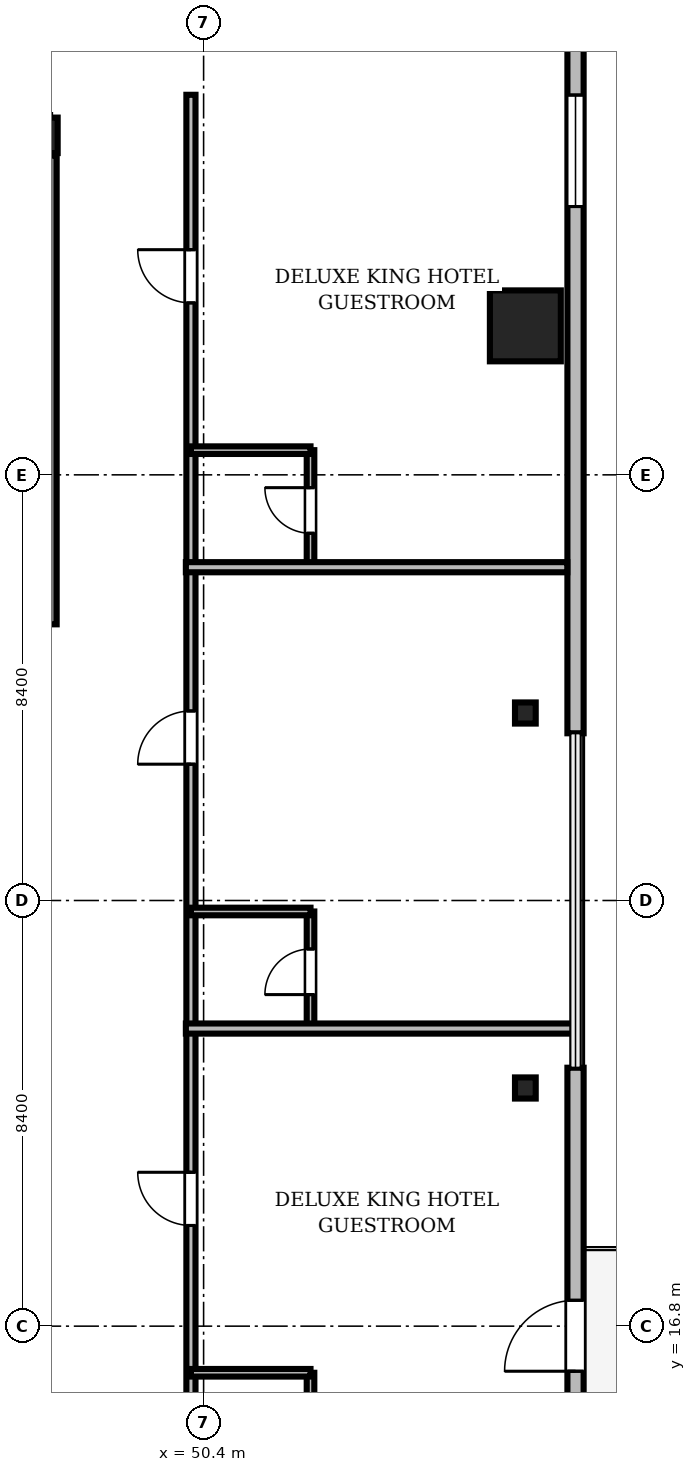
"""IFC4 building model, lengths in metres.
Left out: names, types, materials, properties, quantities, classifications, styles, units other than length and angle.
Written with IfcOpenShell. Run it as: python <this file> out.ifc"""

import sys

from ifc_helpers import new_model, si_unit, direction, frame, frame_2d, origin, origin_2d, place, context, subcontext, project, spatial, rectangle, i_section, extrude, source, transform, mapped, element, fill, save


model = new_model("IFC4")
c1 = context("Model", 3, precision=1e-05, world=origin(), true_north=direction((0.0, 1.0)))
c2 = subcontext(c1, "Body", "Model", "MODEL_VIEW")
j1 = project(units=[si_unit("LENGTHUNIT", "METRE"), si_unit("PLANEANGLEUNIT", "RADIAN")], contexts=[c1])
p1 = place(None, origin())
s1 = spatial("IfcSite", under=j1, at=p1, CompositionType="ELEMENT")
p2 = place(p1, origin())
s2 = spatial("IfcBuilding", under=s1, at=p2, CompositionType="ELEMENT")
p3 = place(p2, frame((0.0, 0.0, 222.3)))
s3 = spatial("IfcBuildingStorey", under=s2, at=p3, CompositionType="ELEMENT", Elevation=222.3)
m1 = source(origin(), c2, "Body", "SweptSolid", [
    extrude(i_section(OverallWidth=0.3, OverallDepth=0.7, WebThickness=0.017, FlangeThickness=0.032, FilletRadius=0.027, at=origin_2d()), origin(), (0.0, 0.0, 1.0), 3.53),
])
p4 = place(p3, frame((47.37, 40.3, 0.0), z_axis=(0.0, 0.0, 1.0), x_axis=(1.0, 0.0, 0.0)))
e1 = element("IfcColumn", 1, at=p4, inside=s3, PredefinedType="COLUMN", context=c2, shape_type="MappedRepresentation", body=[
    mapped(m1, transform((0.0, 0.0, 0.0), scale=1.0)),
])
m2 = source(origin(), c2, "Body", "SweptSolid", [
    extrude(rectangle(XDim=1.4, YDim=1.4, at=origin_2d()), origin(), (0.0, 0.0, 1.0), 3.53),
])
p5 = place(p3, frame((56.75, 36.54, 0.0), z_axis=(0.0, 0.0, 1.0), x_axis=(1.0, 0.0, 0.0)))
e2 = element("IfcColumn", 2, at=p5, inside=s3, PredefinedType="COLUMN", context=c2, shape_type="MappedRepresentation", body=[
    mapped(m2, transform((0.0, 0.0, 0.0), scale=1.0)),
])
m3 = source(origin(), c2, "Body", "SweptSolid", [
    extrude(i_section(OverallWidth=0.409, OverallDepth=0.417, WebThickness=0.021, FlangeThickness=0.033, FilletRadius=0.015, at=origin_2d()), origin(), (0.0, 0.0, 1.0), 3.53),
])
for number, where, z_axis, x_axis in (
    (3, (56.75, 21.5, 0.0), (0.0, 0.0, 1.0), (1.0, 0.0, 0.0)),
    (4, (56.75, 28.9, 0.0), (0.0, 0.0, 1.0), (1.0, 0.0, 0.0)),
):
    element("IfcColumn", number, at=place(p3, frame(where, z_axis=z_axis, x_axis=x_axis)), inside=s3, PredefinedType="COLUMN", context=c2, shape_type="MappedRepresentation", body=[
        mapped(m3, transform((0.0, 0.0, 0.0), scale=1.0)),
    ])
m4 = source(origin(), c2, "Body", "SweptSolid", [
    extrude(rectangle(XDim=15.6, YDim=0.32, at=frame_2d((7.8, 0.0))), origin(), (0.0, 0.0, 1.0), 3.53),
])
p6 = place(p3, frame((57.74, 6.3, 0.0), z_axis=(0.0, 0.0, 1.0), x_axis=(0.0, 1.0, 0.0)))
e5 = element("IfcWall", 5, at=p6, inside=s3, PredefinedType="SOLIDWALL", context=c2, shape_type="MappedRepresentation", body=[
    mapped(m4, transform((0.0, 0.0, 0.0), scale=1.0)),
])
m5 = source(origin(), c2, "Body", "SweptSolid", [
    extrude(rectangle(XDim=1.4, YDim=2.3, at=frame_2d((0.7, 1.15))), frame((0.0, 0.17, 0.0), z_axis=(0.0, -1.0, 0.0), x_axis=(1.0, 0.0, 0.0)), (0.0, 0.0, 1.0), 0.34),
])
p7 = place(p6, frame((9.61, 0.0, 0.0)))
e6 = element("IfcOpeningElement", 6, at=p7, cuts=e5, PredefinedType="OPENING", context=c2, shape_type="MappedRepresentation", body=[
    mapped(m5, transform((0.0, 0.0, 0.0), scale=1.0)),
])
m6 = source(origin(), c2, "Body", "SweptSolid", [
    extrude(rectangle(XDim=2.2, YDim=2.4, at=frame_2d((1.1, 1.2))), frame((0.0, 0.17, 0.0), z_axis=(0.0, -1.0, 0.0), x_axis=(1.0, 0.0, 0.0)), (0.0, 0.0, 1.0), 0.34),
])
p8 = place(p6, frame((3.005, 0.0, 0.72)))
e7 = element("IfcOpeningElement", 7, at=p8, cuts=e5, PredefinedType="OPENING", context=c2, shape_type="MappedRepresentation", body=[
    mapped(m6, transform((0.0, 0.0, 0.0), scale=1.0)),
])
m7 = source(origin(), c2, "Body", "SweptSolid", [
    extrude(rectangle(XDim=15.6, YDim=0.32, at=frame_2d((7.8, 0.0))), origin(), (0.0, 0.0, 1.0), 3.53),
])
p9 = place(p3, frame((57.74, 28.5, 0.0), z_axis=(0.0, 0.0, 1.0), x_axis=(0.0, 1.0, 0.0)))
e8 = element("IfcWall", 8, at=p9, inside=s3, PredefinedType="SOLIDWALL", context=c2, shape_type="MappedRepresentation", body=[
    mapped(m7, transform((0.0, 0.0, 0.0), scale=1.0)),
])
p10 = place(p9, frame((10.395, 0.0, 0.72)))
e9 = element("IfcOpeningElement", 9, at=p10, cuts=e8, PredefinedType="OPENING", context=c2, shape_type="MappedRepresentation", body=[
    mapped(m6, transform((0.0, 0.0, 0.0), scale=1.0)),
])
m8 = source(origin(), c2, "Body", "SweptSolid", [
    extrude(rectangle(XDim=9.25, YDim=0.25, at=frame_2d((4.625, 0.0))), origin(), (0.0, 0.0, 1.0), 3.55),
])
p11 = place(p3, frame((47.375, 30.65, 0.0), z_axis=(0.0, 0.0, 1.0), x_axis=(0.0, 1.0, 0.0)))
e10 = element("IfcWall", 10, at=p11, inside=s3, PredefinedType="SOLIDWALL", context=c2, shape_type="MappedRepresentation", body=[
    mapped(m8, transform((0.0, 0.0, 0.0), scale=1.0)),
])
m9 = source(origin(), c2, "Body", "SweptSolid", [
    extrude(rectangle(XDim=27.53, YDim=0.18, at=frame_2d((13.765, 0.0))), origin(), (0.0, 0.0, 1.0), 2.972),
])
p12 = place(p3, frame((50.15, 13.57, 0.0), z_axis=(0.0, 0.0, 1.0), x_axis=(0.0, 1.0, 0.0)))
e11 = element("IfcWall", 11, at=p12, inside=s3, PredefinedType="PARTITIONING", context=c2, shape_type="MappedRepresentation", body=[
    mapped(m9, transform((0.0, 0.0, 0.0), scale=1.0)),
])
m10 = source(origin(), c2, "Body", "SweptSolid", [
    extrude(rectangle(XDim=1.05, YDim=2.2, at=frame_2d((0.525, 1.1))), frame((0.0, 0.1, 0.0), z_axis=(0.0, -1.0, 0.0), x_axis=(1.0, 0.0, 0.0)), (0.0, 0.0, 1.0), 0.2),
])
p13 = place(p12, frame((5.217, 0.0, 0.0)))
e12 = element("IfcOpeningElement", 12, at=p13, cuts=e11, PredefinedType="OPENING", context=c2, shape_type="MappedRepresentation", body=[
    mapped(m10, transform((0.0, 0.0, 0.0), scale=1.0)),
])
p14 = place(p12, frame((14.32, 0.0, 0.0)))
e13 = element("IfcOpeningElement", 13, at=p14, cuts=e11, PredefinedType="OPENING", context=c2, shape_type="MappedRepresentation", body=[
    mapped(m10, transform((0.0, 0.0, 0.0), scale=1.0)),
])
p15 = place(p12, frame((23.423, 0.0, 0.0)))
e14 = element("IfcOpeningElement", 14, at=p15, cuts=e11, PredefinedType="OPENING", context=c2, shape_type="MappedRepresentation", body=[
    mapped(m10, transform((0.0, 0.0, 0.0), scale=1.0)),
])
m11 = source(origin(), c2, "Body", "SweptSolid", [
    extrude(rectangle(XDim=2.29, YDim=0.15, at=frame_2d((1.145, 0.0))), origin(), (0.0, 0.0, 1.0), 2.972),
])
p16 = place(p3, frame((52.51, 13.59, 0.0), z_axis=(0.0, 0.0, 1.0), x_axis=(0.0, 1.0, 0.0)))
e15 = element("IfcWall", 15, at=p16, inside=s3, PredefinedType="PARTITIONING", context=c2, shape_type="MappedRepresentation", body=[
    mapped(m11, transform((0.0, 0.0, 0.0), scale=1.0)),
])
m12 = source(origin(), c2, "Body", "SweptSolid", [
    extrude(rectangle(XDim=0.9, YDim=2.1, at=frame_2d((0.45, 1.05))), frame((0.0, 0.085, 0.0), z_axis=(0.0, -1.0, 0.0), x_axis=(1.0, 0.0, 0.0)), (0.0, 0.0, 1.0), 0.17),
])
p17 = place(p16, frame((0.65, 0.0, 0.0)))
e16 = element("IfcOpeningElement", 16, at=p17, cuts=e15, PredefinedType="OPENING", context=c2, shape_type="MappedRepresentation", body=[
    mapped(m12, transform((0.0, 0.0, 0.0), scale=1.0)),
])
m13 = source(origin(), c2, "Body", "SweptSolid", [
    extrude(rectangle(XDim=2.29, YDim=0.15, at=frame_2d((1.145, 0.0))), origin(), (0.0, 0.0, 1.0), 3.222),
])
p18 = place(p3, frame((52.51, 22.693, 0.0), z_axis=(0.0, 0.0, 1.0), x_axis=(0.0, 1.0, 0.0)))
e17 = element("IfcWall", 17, at=p18, inside=s3, PredefinedType="PARTITIONING", context=c2, shape_type="MappedRepresentation", body=[
    mapped(m13, transform((0.0, 0.0, 0.0), scale=1.0)),
])
p19 = place(p18, frame((0.65, 0.0, 0.0)))
e18 = element("IfcOpeningElement", 18, at=p19, cuts=e17, PredefinedType="OPENING", context=c2, shape_type="MappedRepresentation", body=[
    mapped(m12, transform((0.0, 0.0, 0.0), scale=1.0)),
])
m14 = source(origin(), c2, "Body", "SweptSolid", [
    extrude(rectangle(XDim=2.29, YDim=0.15, at=frame_2d((1.145, 0.0))), origin(), (0.0, 0.0, 1.0), 3.53),
])
p20 = place(p3, frame((52.51, 31.797, 0.0), z_axis=(0.0, 0.0, 1.0), x_axis=(0.0, 1.0, 0.0)))
e19 = element("IfcWall", 19, at=p20, inside=s3, PredefinedType="PARTITIONING", context=c2, shape_type="MappedRepresentation", body=[
    mapped(m14, transform((0.0, 0.0, 0.0), scale=1.0)),
])
p21 = place(p20, frame((0.65, 0.0, 0.0)))
e20 = element("IfcOpeningElement", 20, at=p21, cuts=e19, PredefinedType="OPENING", context=c2, shape_type="MappedRepresentation", body=[
    mapped(m12, transform((0.0, 0.0, 0.0), scale=1.0)),
])
m15 = source(origin(), c2, "Body", "SweptSolid", [
    extrude(rectangle(XDim=7.72, YDim=0.2, at=frame_2d((3.86, 0.0))), origin(), (0.0, 0.0, 1.0), 2.772),
])
p22 = place(p3, frame((50.05, 22.673, 0.0), z_axis=(0.0, 0.0, 1.0), x_axis=(1.0, 0.0, 0.0)))
e21 = element("IfcWall", 21, at=p22, inside=s3, PredefinedType="PARTITIONING", context=c2, shape_type="MappedRepresentation", body=[
    mapped(m15, transform((0.0, 0.0, 0.0), scale=1.0)),
])
m16 = source(origin(), c2, "Body", "SweptSolid", [
    extrude(rectangle(XDim=7.528, YDim=0.2, at=frame_2d((3.764, 0.0))), origin(), (0.0, 0.0, 1.0), 2.772),
])
p23 = place(p3, frame((50.05, 31.777, 0.0), z_axis=(0.0, 0.0, 1.0), x_axis=(1.0, 0.0, 0.0)))
e22 = element("IfcWall", 22, at=p23, inside=s3, PredefinedType="PARTITIONING", context=c2, shape_type="MappedRepresentation", body=[
    mapped(m16, transform((0.0, 0.0, 0.0), scale=1.0)),
])
m17 = source(origin(), c2, "Body", "SweptSolid", [
    extrude(rectangle(XDim=2.36, YDim=0.15, at=frame_2d((1.18, 0.0))), origin(), (0.0, 0.0, 1.0), 3.53),
])
for number, where, z_axis, x_axis in (
    (23, (50.15, 15.88, 0.0), (0.0, 0.0, 1.0), (1.0, 0.0, 0.0)),
    (24, (50.15, 24.983, 0.0), (0.0, 0.0, 1.0), (1.0, 0.0, 0.0)),
    (25, (50.15, 34.087, 0.0), (0.0, 0.0, 1.0), (1.0, 0.0, 0.0)),
):
    element("IfcWall", number, at=place(p3, frame(where, z_axis=z_axis, x_axis=x_axis)), inside=s3, PredefinedType="PARTITIONING", context=c2, shape_type="MappedRepresentation", body=[
        mapped(m17, transform((0.0, 0.0, 0.0), scale=1.0)),
    ])
m18 = source(origin(), c2, "Body", "SweptSolid", [
    extrude(rectangle(XDim=1.4, YDim=2.3, at=frame_2d((0.7, 1.15))), frame((0.0, 0.025, 0.0), z_axis=(0.0, -1.0, 0.0), x_axis=(1.0, 0.0, 0.0)), (0.0, 0.0, 1.0), 0.05),
])
p24 = place(p7, frame((1.4, 0.0, 0.0), z_axis=(0.0, 0.0, 1.0), x_axis=(-1.0, 0.0, 0.0)))
e26 = element("IfcDoor", 26, at=p24, inside=s3, OperationType="DOUBLE_DOOR_SLIDING", PredefinedType="DOOR", context=c2, shape_type="MappedRepresentation", body=[
    mapped(m18, transform((0.0, 0.0, 0.0), scale=1.0)),
])
fill(e6, e26)
m19 = source(origin(), c2, "Body", "SweptSolid", [
    extrude(rectangle(XDim=2.2, YDim=2.4, at=frame_2d((1.1, 1.2))), frame((0.0, 0.03, 0.0), z_axis=(0.0, -1.0, 0.0), x_axis=(1.0, 0.0, 0.0)), (0.0, 0.0, 1.0), 0.06),
])
p25 = place(p10, origin())
e27 = element("IfcWindow", 27, at=p25, inside=s3, PartitioningType="SINGLE_PANEL", PredefinedType="WINDOW", context=c2, shape_type="MappedRepresentation", body=[
    mapped(m19, transform((0.0, 0.0, 0.0), scale=1.0)),
])
fill(e9, e27)
m20 = source(origin(), c2, "Body", "SweptSolid", [
    extrude(rectangle(XDim=1.05, YDim=2.2, at=frame_2d((0.525, 1.1))), frame((0.0, 0.025, 0.0), z_axis=(0.0, -1.0, 0.0), x_axis=(1.0, 0.0, 0.0)), (0.0, 0.0, 1.0), 0.05),
])
p26 = place(p13, origin())
e28 = element("IfcDoor", 28, at=p26, inside=s3, OperationType="SINGLE_SWING_RIGHT", PredefinedType="DOOR", context=c2, shape_type="MappedRepresentation", body=[
    mapped(m20, transform((0.0, 0.0, 0.0), scale=1.0)),
])
fill(e12, e28)
p27 = place(p14, origin())
e29 = element("IfcDoor", 29, at=p27, inside=s3, OperationType="SINGLE_SWING_LEFT", PredefinedType="DOOR", context=c2, shape_type="MappedRepresentation", body=[
    mapped(m20, transform((0.0, 0.0, 0.0), scale=1.0)),
])
fill(e13, e29)
p28 = place(p15, origin())
e30 = element("IfcDoor", 30, at=p28, inside=s3, OperationType="SINGLE_SWING_RIGHT", PredefinedType="DOOR", context=c2, shape_type="MappedRepresentation", body=[
    mapped(m20, transform((0.0, 0.0, 0.0), scale=1.0)),
])
fill(e14, e30)
m21 = source(origin(), c2, "Body", "SweptSolid", [
    extrude(rectangle(XDim=0.9, YDim=2.1, at=frame_2d((0.45, 1.05))), frame((0.0, 0.025, 0.0), z_axis=(0.0, -1.0, 0.0), x_axis=(1.0, 0.0, 0.0)), (0.0, 0.0, 1.0), 0.05),
])
p29 = place(p19, origin())
e31 = element("IfcDoor", 31, at=p29, inside=s3, OperationType="SINGLE_SWING_LEFT", PredefinedType="DOOR", context=c2, shape_type="MappedRepresentation", body=[
    mapped(m21, transform((0.0, 0.0, 0.0), scale=1.0)),
])
fill(e18, e31)
p30 = place(p21, origin())
e32 = element("IfcDoor", 32, at=p30, inside=s3, OperationType="SINGLE_SWING_RIGHT", PredefinedType="DOOR", context=c2, shape_type="MappedRepresentation", body=[
    mapped(m21, transform((0.0, 0.0, 0.0), scale=1.0)),
])
fill(e20, e32)
save(model, sys.argv[1])
